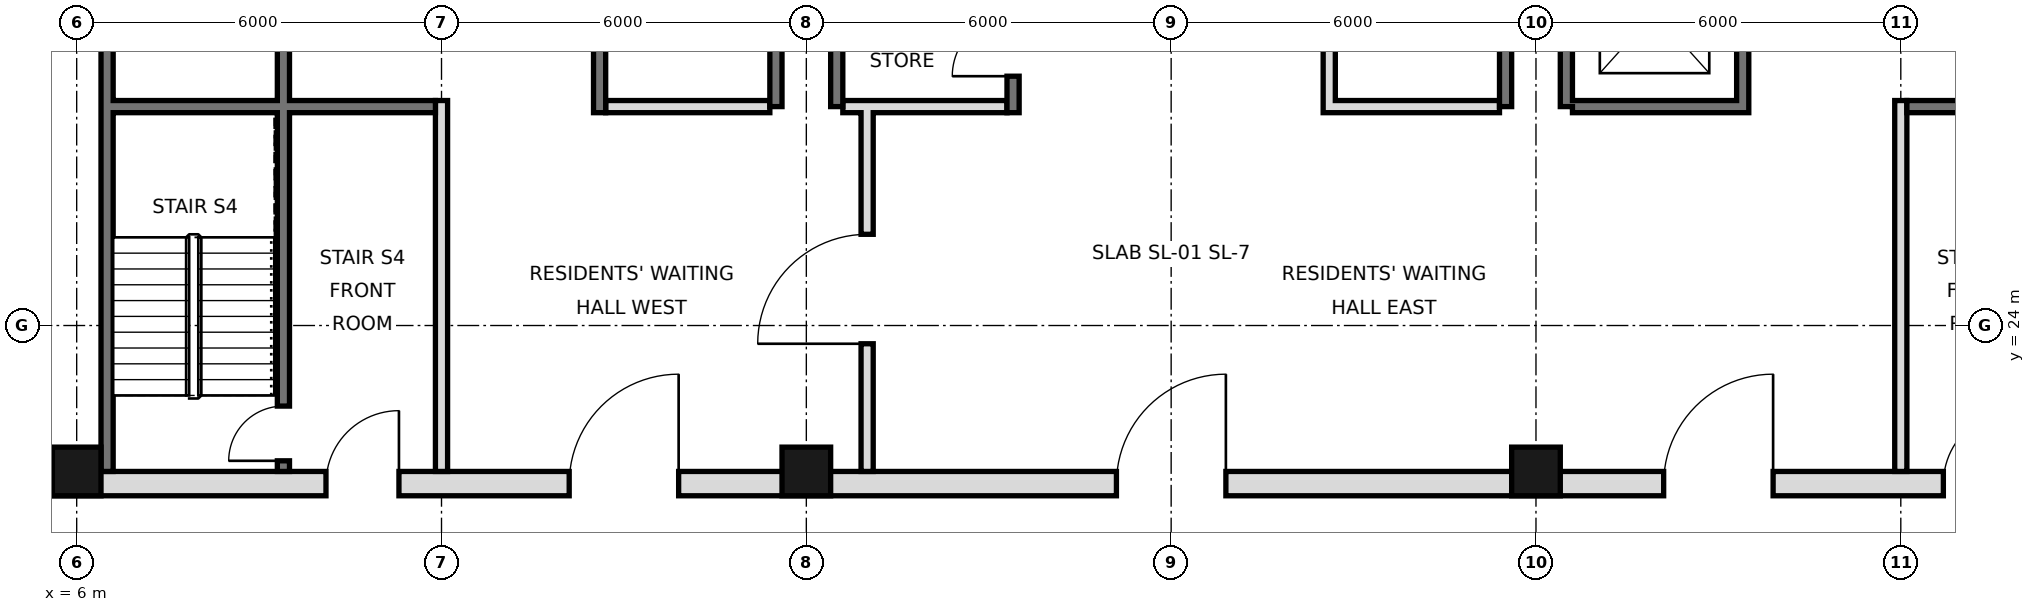
"""IFC4 building model, lengths in metres.
Left out: names, types, materials, properties, quantities, classifications, styles, units other than length and angle.
Written with IfcOpenShell. Run it as: python <this file> out.ifc"""

import sys

from ifc_helpers import new_model, si_unit, direction, frame, frame_2d, origin, origin_2d, place, context, subcontext, project, spatial, rectangle, hollow_rectangle, extrude, element, fill, save


model = new_model("IFC4")
c1 = context("Model", 3, precision=1e-05, world=origin(), true_north=direction((0.0, 1.0)))
c2 = subcontext(c1, "Body", "Model", "MODEL_VIEW")
j1 = project(units=[si_unit("LENGTHUNIT", "METRE"), si_unit("PLANEANGLEUNIT", "RADIAN")], contexts=[c1])
p1 = place(None, origin())
s1 = spatial("IfcSite", under=j1, at=p1, CompositionType="ELEMENT")
p2 = place(p1, origin())
s2 = spatial("IfcBuilding", under=s1, at=p2, CompositionType="ELEMENT")
p3 = place(p2, frame((0.0, 0.0, 246.8)))
s3 = spatial("IfcBuildingStorey", under=s2, at=p3, CompositionType="ELEMENT", Elevation=246.8)
for number, where, z_axis, x_axis in (
    (1, (6.0, 21.6, 0.0), (0.0, 0.0, 1.0), (1.0, 0.0, 0.0)),
    (2, (18.0, 21.6, 0.0), (0.0, 0.0, 1.0), (1.0, 0.0, 0.0)),
    (3, (30.0, 21.6, 0.0), (0.0, 0.0, 1.0), (1.0, 0.0, 0.0)),
):
    element("IfcColumn", number, at=place(p3, frame(where, z_axis=z_axis, x_axis=x_axis)), inside=s3, PredefinedType="COLUMN", context=c2, shape_type="SweptSolid", body=[
        extrude(hollow_rectangle(XDim=0.8, YDim=0.8, WallThickness=0.032, at=origin_2d()), origin(), (0.0, 0.0, 1.0), 3.6),
    ])
p4 = place(p3, frame((6.5, 21.6, 0.0), z_axis=(0.0, 0.0, 1.0), x_axis=(0.0, 1.0, 0.0)))
e4 = element("IfcWall", 4, at=p4, inside=s3, PredefinedType="SOLIDWALL", context=c2, shape_type="SweptSolid", body=[
    extrude(rectangle(XDim=23.5, YDim=0.2, at=frame_2d((11.75, 0.0))), origin(), (0.0, 0.0, 1.0), 3.42),
])
for number, where, z_axis, x_axis in (
    (5, (17.5, 27.6, 0.0), (0.0, 0.0, 1.0), (0.0, 1.0, 0.0)),
    (6, (18.5, 27.6, 0.0), (0.0, 0.0, 1.0), (0.0, 1.0, 0.0)),
    (7, (29.5, 27.6, 0.0), (0.0, 0.0, 1.0), (0.0, 1.0, 0.0)),
    (8, (30.5, 27.6, 0.0), (0.0, 0.0, 1.0), (0.0, 1.0, 0.0)),
):
    element("IfcWall", number, at=place(p3, frame(where, z_axis=z_axis, x_axis=x_axis)), inside=s3, PredefinedType="SOLIDWALL", context=c2, shape_type="SweptSolid", body=[
        extrude(rectangle(XDim=17.5, YDim=0.2, at=frame_2d((8.75, 0.0))), origin(), (0.0, 0.0, 1.0), 3.42),
    ])
p5 = place(p3, frame((5.6, 21.4, 0.0), z_axis=(0.0, 0.0, 1.0), x_axis=(1.0, 0.0, 0.0)))
e9 = element("IfcWall", 9, at=p5, inside=s3, PredefinedType="SOLIDWALL", context=c2, shape_type="SweptSolid", body=[
    extrude(rectangle(XDim=36.8, YDim=0.4, at=frame_2d((18.4, 0.0))), origin(), (0.0, 0.0, 1.0), 3.42),
])
p6 = place(p5, frame((8.5, 0.0, 0.0)))
e10 = element("IfcOpeningElement", 10, at=p6, cuts=e9, PredefinedType="OPENING", context=c2, shape_type="SweptSolid", body=[
    extrude(rectangle(XDim=1.8, YDim=2.1, at=frame_2d((0.9, 1.05))), frame((0.0, 0.21, 0.0), z_axis=(0.0, -1.0, 0.0), x_axis=(1.0, 0.0, 0.0)), (0.0, 0.0, 1.0), 0.42),
])
p7 = place(p5, frame((17.5, 0.0, 0.0)))
e11 = element("IfcOpeningElement", 11, at=p7, cuts=e9, PredefinedType="OPENING", context=c2, shape_type="SweptSolid", body=[
    extrude(rectangle(XDim=1.8, YDim=2.1, at=frame_2d((0.9, 1.05))), frame((0.0, 0.21, 0.0), z_axis=(0.0, -1.0, 0.0), x_axis=(1.0, 0.0, 0.0)), (0.0, 0.0, 1.0), 0.42),
])
p8 = place(p5, frame((26.5, 0.0, 0.0)))
e12 = element("IfcOpeningElement", 12, at=p8, cuts=e9, PredefinedType="OPENING", context=c2, shape_type="SweptSolid", body=[
    extrude(rectangle(XDim=1.8, YDim=2.1, at=frame_2d((0.9, 1.05))), frame((0.0, 0.21, 0.0), z_axis=(0.0, -1.0, 0.0), x_axis=(1.0, 0.0, 0.0)), (0.0, 0.0, 1.0), 0.42),
])
p9 = place(p5, frame((4.5, 0.0, 0.0)))
e13 = element("IfcOpeningElement", 13, at=p9, cuts=e9, PredefinedType="OPENING", context=c2, shape_type="SweptSolid", body=[
    extrude(rectangle(XDim=1.2, YDim=2.1, at=frame_2d((0.6, 1.05))), frame((0.0, 0.21, 0.0), z_axis=(0.0, -1.0, 0.0), x_axis=(1.0, 0.0, 0.0)), (0.0, 0.0, 1.0), 0.42),
])
p10 = place(p5, frame((31.1, 0.0, 0.0)))
e14 = element("IfcOpeningElement", 14, at=p10, cuts=e9, PredefinedType="OPENING", context=c2, shape_type="SweptSolid", body=[
    extrude(rectangle(XDim=1.2, YDim=2.1, at=frame_2d((0.6, 1.05))), frame((0.0, 0.21, 0.0), z_axis=(0.0, -1.0, 0.0), x_axis=(1.0, 0.0, 0.0)), (0.0, 0.0, 1.0), 0.42),
])
p11 = place(p3, frame((19.0, 21.6, 0.0), z_axis=(0.0, 0.0, 1.0), x_axis=(0.0, 1.0, 0.0)))
e15 = element("IfcWall", 15, at=p11, inside=s3, PredefinedType="PARTITIONING", context=c2, shape_type="SweptSolid", body=[
    extrude(rectangle(XDim=6.0, YDim=0.2, at=frame_2d((3.0, 0.0))), origin(), (0.0, 0.0, 1.0), 3.42),
])
p12 = place(p11, frame((2.1, 0.0, 0.0)))
e16 = element("IfcOpeningElement", 16, at=p12, cuts=e15, PredefinedType="OPENING", context=c2, shape_type="SweptSolid", body=[
    extrude(rectangle(XDim=1.8, YDim=2.1, at=frame_2d((0.9, 1.05))), frame((0.0, 0.11, 0.0), z_axis=(0.0, -1.0, 0.0), x_axis=(1.0, 0.0, 0.0)), (0.0, 0.0, 1.0), 0.22),
])
p13 = place(p3, frame((12.0, 21.6, 0.0), z_axis=(0.0, 0.0, 1.0), x_axis=(0.0, 1.0, 0.0)))
e17 = element("IfcWall", 17, at=p13, inside=s3, PredefinedType="PARTITIONING", context=c2, shape_type="SweptSolid", body=[
    extrude(rectangle(XDim=6.1, YDim=0.2, at=frame_2d((3.05, 0.0))), origin(), (0.0, 0.0, 1.0), 3.42),
])
p14 = place(p3, frame((14.6, 27.5, 0.0), z_axis=(0.0, 0.0, 1.0), x_axis=(0.0, 1.0, 0.0)))
e18 = element("IfcWall", 18, at=p14, inside=s3, PredefinedType="SOLIDWALL", context=c2, shape_type="SweptSolid", body=[
    extrude(rectangle(XDim=17.5, YDim=0.2, at=frame_2d((8.75, 0.0))), origin(), (0.0, 0.0, 1.0), 3.42),
])
p15 = place(p14, frame((15.4, 0.0, 0.0)))
e19 = element("IfcOpeningElement", 19, at=p15, cuts=e18, PredefinedType="OPENING", context=c2, shape_type="SweptSolid", body=[
    extrude(rectangle(XDim=1.1, YDim=2.1, at=frame_2d((0.55, 1.05))), frame((0.0, 0.11, 0.0), z_axis=(0.0, -1.0, 0.0), x_axis=(1.0, 0.0, 0.0)), (0.0, 0.0, 1.0), 0.22),
])
p16 = place(p14, frame((2.7, 0.0, 0.0)))
e20 = element("IfcOpeningElement", 20, at=p16, cuts=e18, PredefinedType="OPENING", context=c2, shape_type="SweptSolid", body=[
    extrude(rectangle(XDim=1.0, YDim=2.1, at=frame_2d((0.5, 1.05))), frame((0.0, 0.11, 0.0), z_axis=(0.0, -1.0, 0.0), x_axis=(1.0, 0.0, 0.0)), (0.0, 0.0, 1.0), 0.22),
])
p17 = place(p14, frame((9.9, 0.0, 0.0)))
e21 = element("IfcOpeningElement", 21, at=p17, cuts=e18, PredefinedType="OPENING", context=c2, shape_type="SweptSolid", body=[
    extrude(rectangle(XDim=0.9, YDim=2.1, at=frame_2d((0.45, 1.05))), frame((0.0, 0.11, 0.0), z_axis=(0.0, -1.0, 0.0), x_axis=(1.0, 0.0, 0.0)), (0.0, 0.0, 1.0), 0.22),
])
p18 = place(p3, frame((21.4, 27.5, 0.0), z_axis=(0.0, 0.0, 1.0), x_axis=(0.0, 1.0, 0.0)))
e22 = element("IfcWall", 22, at=p18, inside=s3, PredefinedType="SOLIDWALL", context=c2, shape_type="SweptSolid", body=[
    extrude(rectangle(XDim=17.5, YDim=0.2, at=frame_2d((8.75, 0.0))), origin(), (0.0, 0.0, 1.0), 3.42),
])
p19 = place(p18, frame((0.6, 0.0, 0.0)))
e23 = element("IfcOpeningElement", 23, at=p19, cuts=e22, PredefinedType="OPENING", context=c2, shape_type="SweptSolid", body=[
    extrude(rectangle(XDim=1.0, YDim=2.1, at=frame_2d((0.5, 1.05))), frame((0.0, 0.11, 0.0), z_axis=(0.0, -1.0, 0.0), x_axis=(1.0, 0.0, 0.0)), (0.0, 0.0, 1.0), 0.22),
])
p20 = place(p18, frame((3.7, 0.0, 0.0)))
e24 = element("IfcOpeningElement", 24, at=p20, cuts=e22, PredefinedType="OPENING", context=c2, shape_type="SweptSolid", body=[
    extrude(rectangle(XDim=1.0, YDim=2.1, at=frame_2d((0.5, 1.05))), frame((0.0, 0.11, 0.0), z_axis=(0.0, -1.0, 0.0), x_axis=(1.0, 0.0, 0.0)), (0.0, 0.0, 1.0), 0.22),
])
p21 = place(p18, frame((9.8, 0.0, 0.0)))
e25 = element("IfcOpeningElement", 25, at=p21, cuts=e22, PredefinedType="OPENING", context=c2, shape_type="SweptSolid", body=[
    extrude(rectangle(XDim=1.0, YDim=2.1, at=frame_2d((0.5, 1.05))), frame((0.0, 0.11, 0.0), z_axis=(0.0, -1.0, 0.0), x_axis=(1.0, 0.0, 0.0)), (0.0, 0.0, 1.0), 0.22),
])
p22 = place(p18, frame((7.4, 0.0, 0.0)))
e26 = element("IfcOpeningElement", 26, at=p22, cuts=e22, PredefinedType="OPENING", context=c2, shape_type="SweptSolid", body=[
    extrude(rectangle(XDim=0.9, YDim=2.1, at=frame_2d((0.45, 1.05))), frame((0.0, 0.11, 0.0), z_axis=(0.0, -1.0, 0.0), x_axis=(1.0, 0.0, 0.0)), (0.0, 0.0, 1.0), 0.22),
])
p23 = place(p3, frame((26.6, 27.5, 0.0), z_axis=(0.0, 0.0, 1.0), x_axis=(0.0, 1.0, 0.0)))
e27 = element("IfcWall", 27, at=p23, inside=s3, PredefinedType="SOLIDWALL", context=c2, shape_type="SweptSolid", body=[
    extrude(rectangle(XDim=17.5, YDim=0.2, at=frame_2d((8.75, 0.0))), origin(), (0.0, 0.0, 1.0), 3.42),
])
p24 = place(p23, frame((4.3, 0.0, 0.0)))
e28 = element("IfcOpeningElement", 28, at=p24, cuts=e27, PredefinedType="OPENING", context=c2, shape_type="SweptSolid", body=[
    extrude(rectangle(XDim=0.9, YDim=2.1, at=frame_2d((0.45, 1.05))), frame((0.0, 0.11, 0.0), z_axis=(0.0, -1.0, 0.0), x_axis=(1.0, 0.0, 0.0)), (0.0, 0.0, 1.0), 0.22),
])
p25 = place(p23, frame((10.35, 0.0, 0.0)))
e29 = element("IfcOpeningElement", 29, at=p25, cuts=e27, PredefinedType="OPENING", context=c2, shape_type="SweptSolid", body=[
    extrude(rectangle(XDim=1.0, YDim=2.1, at=frame_2d((0.5, 1.05))), frame((0.0, 0.11, 0.0), z_axis=(0.0, -1.0, 0.0), x_axis=(1.0, 0.0, 0.0)), (0.0, 0.0, 1.0), 0.22),
])
p26 = place(p3, frame((33.4, 27.5, 0.0), z_axis=(0.0, 0.0, 1.0), x_axis=(0.0, 1.0, 0.0)))
e30 = element("IfcWall", 30, at=p26, inside=s3, PredefinedType="SOLIDWALL", context=c2, shape_type="SweptSolid", body=[
    extrude(rectangle(XDim=17.5, YDim=0.2, at=frame_2d((8.75, 0.0))), origin(), (0.0, 0.0, 1.0), 3.42),
])
p27 = place(p26, frame((1.1, 0.0, 0.0)))
e31 = element("IfcOpeningElement", 31, at=p27, cuts=e30, PredefinedType="OPENING", context=c2, shape_type="SweptSolid", body=[
    extrude(rectangle(XDim=1.1, YDim=2.1, at=frame_2d((0.55, 1.05))), frame((0.0, 0.11, 0.0), z_axis=(0.0, -1.0, 0.0), x_axis=(1.0, 0.0, 0.0)), (0.0, 0.0, 1.0), 0.22),
])
p28 = place(p26, frame((4.2, 0.0, 0.0)))
e32 = element("IfcOpeningElement", 32, at=p28, cuts=e30, PredefinedType="OPENING", context=c2, shape_type="SweptSolid", body=[
    extrude(rectangle(XDim=1.1, YDim=2.1, at=frame_2d((0.55, 1.05))), frame((0.0, 0.11, 0.0), z_axis=(0.0, -1.0, 0.0), x_axis=(1.0, 0.0, 0.0)), (0.0, 0.0, 1.0), 0.22),
])
p29 = place(p26, frame((15.4, 0.0, 0.0)))
e33 = element("IfcOpeningElement", 33, at=p29, cuts=e30, PredefinedType="OPENING", context=c2, shape_type="SweptSolid", body=[
    extrude(rectangle(XDim=1.1, YDim=2.1, at=frame_2d((0.55, 1.05))), frame((0.0, 0.11, 0.0), z_axis=(0.0, -1.0, 0.0), x_axis=(1.0, 0.0, 0.0)), (0.0, 0.0, 1.0), 0.22),
])
p30 = place(p26, frame((9.9, 0.0, 0.0)))
e34 = element("IfcOpeningElement", 34, at=p30, cuts=e30, PredefinedType="OPENING", context=c2, shape_type="SweptSolid", body=[
    extrude(rectangle(XDim=0.9, YDim=2.1, at=frame_2d((0.45, 1.05))), frame((0.0, 0.11, 0.0), z_axis=(0.0, -1.0, 0.0), x_axis=(1.0, 0.0, 0.0)), (0.0, 0.0, 1.0), 0.22),
])
p31 = place(p3, frame((36.0, 21.6, 0.0), z_axis=(0.0, 0.0, 1.0), x_axis=(0.0, 1.0, 0.0)))
e35 = element("IfcWall", 35, at=p31, inside=s3, PredefinedType="PARTITIONING", context=c2, shape_type="SweptSolid", body=[
    extrude(rectangle(XDim=6.1, YDim=0.2, at=frame_2d((3.05, 0.0))), origin(), (0.0, 0.0, 1.0), 3.42),
])
p32 = place(p3, frame((9.4, 21.6, 0.0), z_axis=(0.0, 0.0, 1.0), x_axis=(0.0, 1.0, 0.0)))
e36 = element("IfcWall", 36, at=p32, inside=s3, PredefinedType="SOLIDWALL", context=c2, shape_type="SweptSolid", body=[
    extrude(rectangle(XDim=23.4, YDim=0.2, at=frame_2d((11.7, 0.0))), origin(), (0.0, 0.0, 1.0), 3.42),
])
p33 = place(p32, frame((7.95, 0.0, 0.0)))
e37 = element("IfcOpeningElement", 37, at=p33, cuts=e36, PredefinedType="OPENING", context=c2, shape_type="SweptSolid", body=[
    extrude(rectangle(XDim=1.0, YDim=2.1, at=frame_2d((0.5, 1.05))), frame((0.0, 0.11, 0.0), z_axis=(0.0, -1.0, 0.0), x_axis=(1.0, 0.0, 0.0)), (0.0, 0.0, 1.0), 0.22),
])
p34 = place(p32, frame((12.6, 0.0, 0.0)))
e38 = element("IfcOpeningElement", 38, at=p34, cuts=e36, PredefinedType="OPENING", context=c2, shape_type="SweptSolid", body=[
    extrude(rectangle(XDim=1.0, YDim=2.1, at=frame_2d((0.5, 1.05))), frame((0.0, 0.11, 0.0), z_axis=(0.0, -1.0, 0.0), x_axis=(1.0, 0.0, 0.0)), (0.0, 0.0, 1.0), 0.22),
])
p35 = place(p32, frame((15.7, 0.0, 0.0)))
e39 = element("IfcOpeningElement", 39, at=p35, cuts=e36, PredefinedType="OPENING", context=c2, shape_type="SweptSolid", body=[
    extrude(rectangle(XDim=1.0, YDim=2.1, at=frame_2d((0.5, 1.05))), frame((0.0, 0.11, 0.0), z_axis=(0.0, -1.0, 0.0), x_axis=(1.0, 0.0, 0.0)), (0.0, 0.0, 1.0), 0.22),
])
p36 = place(p32, frame((0.175, 0.0, 0.0)))
e40 = element("IfcOpeningElement", 40, at=p36, cuts=e36, PredefinedType="OPENING", context=c2, shape_type="SweptSolid", body=[
    extrude(rectangle(XDim=0.9, YDim=2.1, at=frame_2d((0.45, 1.05))), frame((0.0, 0.11, 0.0), z_axis=(0.0, -1.0, 0.0), x_axis=(1.0, 0.0, 0.0)), (0.0, 0.0, 1.0), 0.22),
])
for number, where, z_axis, x_axis in (
    (41, (14.7, 27.6, 0.0), (0.0, 0.0, 1.0), (1.0, 0.0, 0.0)),
    (42, (18.6, 27.6, 0.0), (0.0, 0.0, 1.0), (1.0, 0.0, 0.0)),
):
    element("IfcWall", number, at=place(p3, frame(where, z_axis=z_axis, x_axis=x_axis)), inside=s3, PredefinedType="PARTITIONING", context=c2, shape_type="SweptSolid", body=[
        extrude(rectangle(XDim=2.7, YDim=0.2, at=frame_2d((1.35, 0.0))), origin(), (0.0, 0.0, 1.0), 3.42),
    ])
for number, where, z_axis, x_axis in (
    (43, (26.7, 27.6, 0.0), (0.0, 0.0, 1.0), (1.0, 0.0, 0.0)),
    (44, (30.6, 27.6, 0.0), (0.0, 0.0, 1.0), (1.0, 0.0, 0.0)),
):
    element("IfcWall", number, at=place(p3, frame(where, z_axis=z_axis, x_axis=x_axis)), inside=s3, PredefinedType="SOLIDWALL", context=c2, shape_type="SweptSolid", body=[
        extrude(rectangle(XDim=2.7, YDim=0.2, at=frame_2d((1.35, 0.0))), origin(), (0.0, 0.0, 1.0), 3.42),
    ])
for number, where, z_axis, x_axis in (
    (45, (36.1, 27.6, 0.0), (0.0, 0.0, 1.0), (1.0, 0.0, 0.0)),
    (46, (6.6, 27.6, 0.0), (0.0, 0.0, 1.0), (1.0, 0.0, 0.0)),
):
    element("IfcWall", number, at=place(p3, frame(where, z_axis=z_axis, x_axis=x_axis)), inside=s3, PredefinedType="SOLIDWALL", context=c2, shape_type="SweptSolid", body=[
        extrude(rectangle(XDim=5.3, YDim=0.2, at=frame_2d((2.65, 0.0))), origin(), (0.0, 0.0, 1.0), 3.42),
    ])
p37 = place(p6, frame((1.8, 0.0, 0.0), z_axis=(0.0, 0.0, 1.0), x_axis=(-1.0, 0.0, 0.0)))
e47 = element("IfcDoor", 47, at=p37, inside=s3, OperationType="SINGLE_SWING_LEFT", PredefinedType="DOOR", context=c2, shape_type="SweptSolid", body=[
    extrude(rectangle(XDim=1.8, YDim=2.1, at=frame_2d((0.9, 1.05))), frame((0.0, 0.025, 0.0), z_axis=(0.0, -1.0, 0.0), x_axis=(1.0, 0.0, 0.0)), (0.0, 0.0, 1.0), 0.05),
])
fill(e10, e47)
p38 = place(p12, origin())
e48 = element("IfcDoor", 48, at=p38, inside=s3, OperationType="SINGLE_SWING_LEFT", PredefinedType="DOOR", context=c2, shape_type="SweptSolid", body=[
    extrude(rectangle(XDim=1.8, YDim=2.1, at=frame_2d((0.9, 1.05))), frame((0.0, 0.025, 0.0), z_axis=(0.0, -1.0, 0.0), x_axis=(1.0, 0.0, 0.0)), (0.0, 0.0, 1.0), 0.05),
])
fill(e16, e48)
p39 = place(p7, frame((1.8, 0.0, 0.0), z_axis=(0.0, 0.0, 1.0), x_axis=(-1.0, 0.0, 0.0)))
e49 = element("IfcDoor", 49, at=p39, inside=s3, OperationType="SINGLE_SWING_LEFT", PredefinedType="DOOR", context=c2, shape_type="SweptSolid", body=[
    extrude(rectangle(XDim=1.8, YDim=2.1, at=frame_2d((0.9, 1.05))), frame((0.0, 0.025, 0.0), z_axis=(0.0, -1.0, 0.0), x_axis=(1.0, 0.0, 0.0)), (0.0, 0.0, 1.0), 0.05),
])
fill(e11, e49)
p40 = place(p8, frame((1.8, 0.0, 0.0), z_axis=(0.0, 0.0, 1.0), x_axis=(-1.0, 0.0, 0.0)))
e50 = element("IfcDoor", 50, at=p40, inside=s3, OperationType="SINGLE_SWING_LEFT", PredefinedType="DOOR", context=c2, shape_type="SweptSolid", body=[
    extrude(rectangle(XDim=1.8, YDim=2.1, at=frame_2d((0.9, 1.05))), frame((0.0, 0.025, 0.0), z_axis=(0.0, -1.0, 0.0), x_axis=(1.0, 0.0, 0.0)), (0.0, 0.0, 1.0), 0.05),
])
fill(e12, e50)
p41 = place(p9, frame((1.2, 0.0, 0.0), z_axis=(0.0, 0.0, 1.0), x_axis=(-1.0, 0.0, 0.0)))
e51 = element("IfcDoor", 51, at=p41, inside=s3, OperationType="SINGLE_SWING_LEFT", PredefinedType="DOOR", context=c2, shape_type="SweptSolid", body=[
    extrude(rectangle(XDim=1.2, YDim=2.1, at=frame_2d((0.6, 1.05))), frame((0.0, 0.025, 0.0), z_axis=(0.0, -1.0, 0.0), x_axis=(1.0, 0.0, 0.0)), (0.0, 0.0, 1.0), 0.05),
])
fill(e13, e51)
p42 = place(p10, frame((1.2, 0.0, 0.0), z_axis=(0.0, 0.0, 1.0), x_axis=(-1.0, 0.0, 0.0)))
e52 = element("IfcDoor", 52, at=p42, inside=s3, OperationType="SINGLE_SWING_LEFT", PredefinedType="DOOR", context=c2, shape_type="SweptSolid", body=[
    extrude(rectangle(XDim=1.2, YDim=2.1, at=frame_2d((0.6, 1.05))), frame((0.0, 0.025, 0.0), z_axis=(0.0, -1.0, 0.0), x_axis=(1.0, 0.0, 0.0)), (0.0, 0.0, 1.0), 0.05),
])
fill(e14, e52)
p43 = place(p19, origin())
e53 = element("IfcDoor", 53, at=p43, inside=s3, OperationType="SINGLE_SWING_LEFT", PredefinedType="DOOR", context=c2, shape_type="SweptSolid", body=[
    extrude(rectangle(XDim=1.0, YDim=2.1, at=frame_2d((0.5, 1.05))), frame((0.0, 0.025, 0.0), z_axis=(0.0, -1.0, 0.0), x_axis=(1.0, 0.0, 0.0)), (0.0, 0.0, 1.0), 0.05),
])
fill(e23, e53)
p44 = place(p36, origin())
e54 = element("IfcDoor", 54, at=p44, inside=s3, OperationType="SINGLE_SWING_LEFT", PredefinedType="DOOR", context=c2, shape_type="SweptSolid", body=[
    extrude(rectangle(XDim=0.9, YDim=2.1, at=frame_2d((0.45, 1.05))), frame((0.0, 0.025, 0.0), z_axis=(0.0, -1.0, 0.0), x_axis=(1.0, 0.0, 0.0)), (0.0, 0.0, 1.0), 0.05),
])
fill(e40, e54)
save(model, sys.argv[1])
